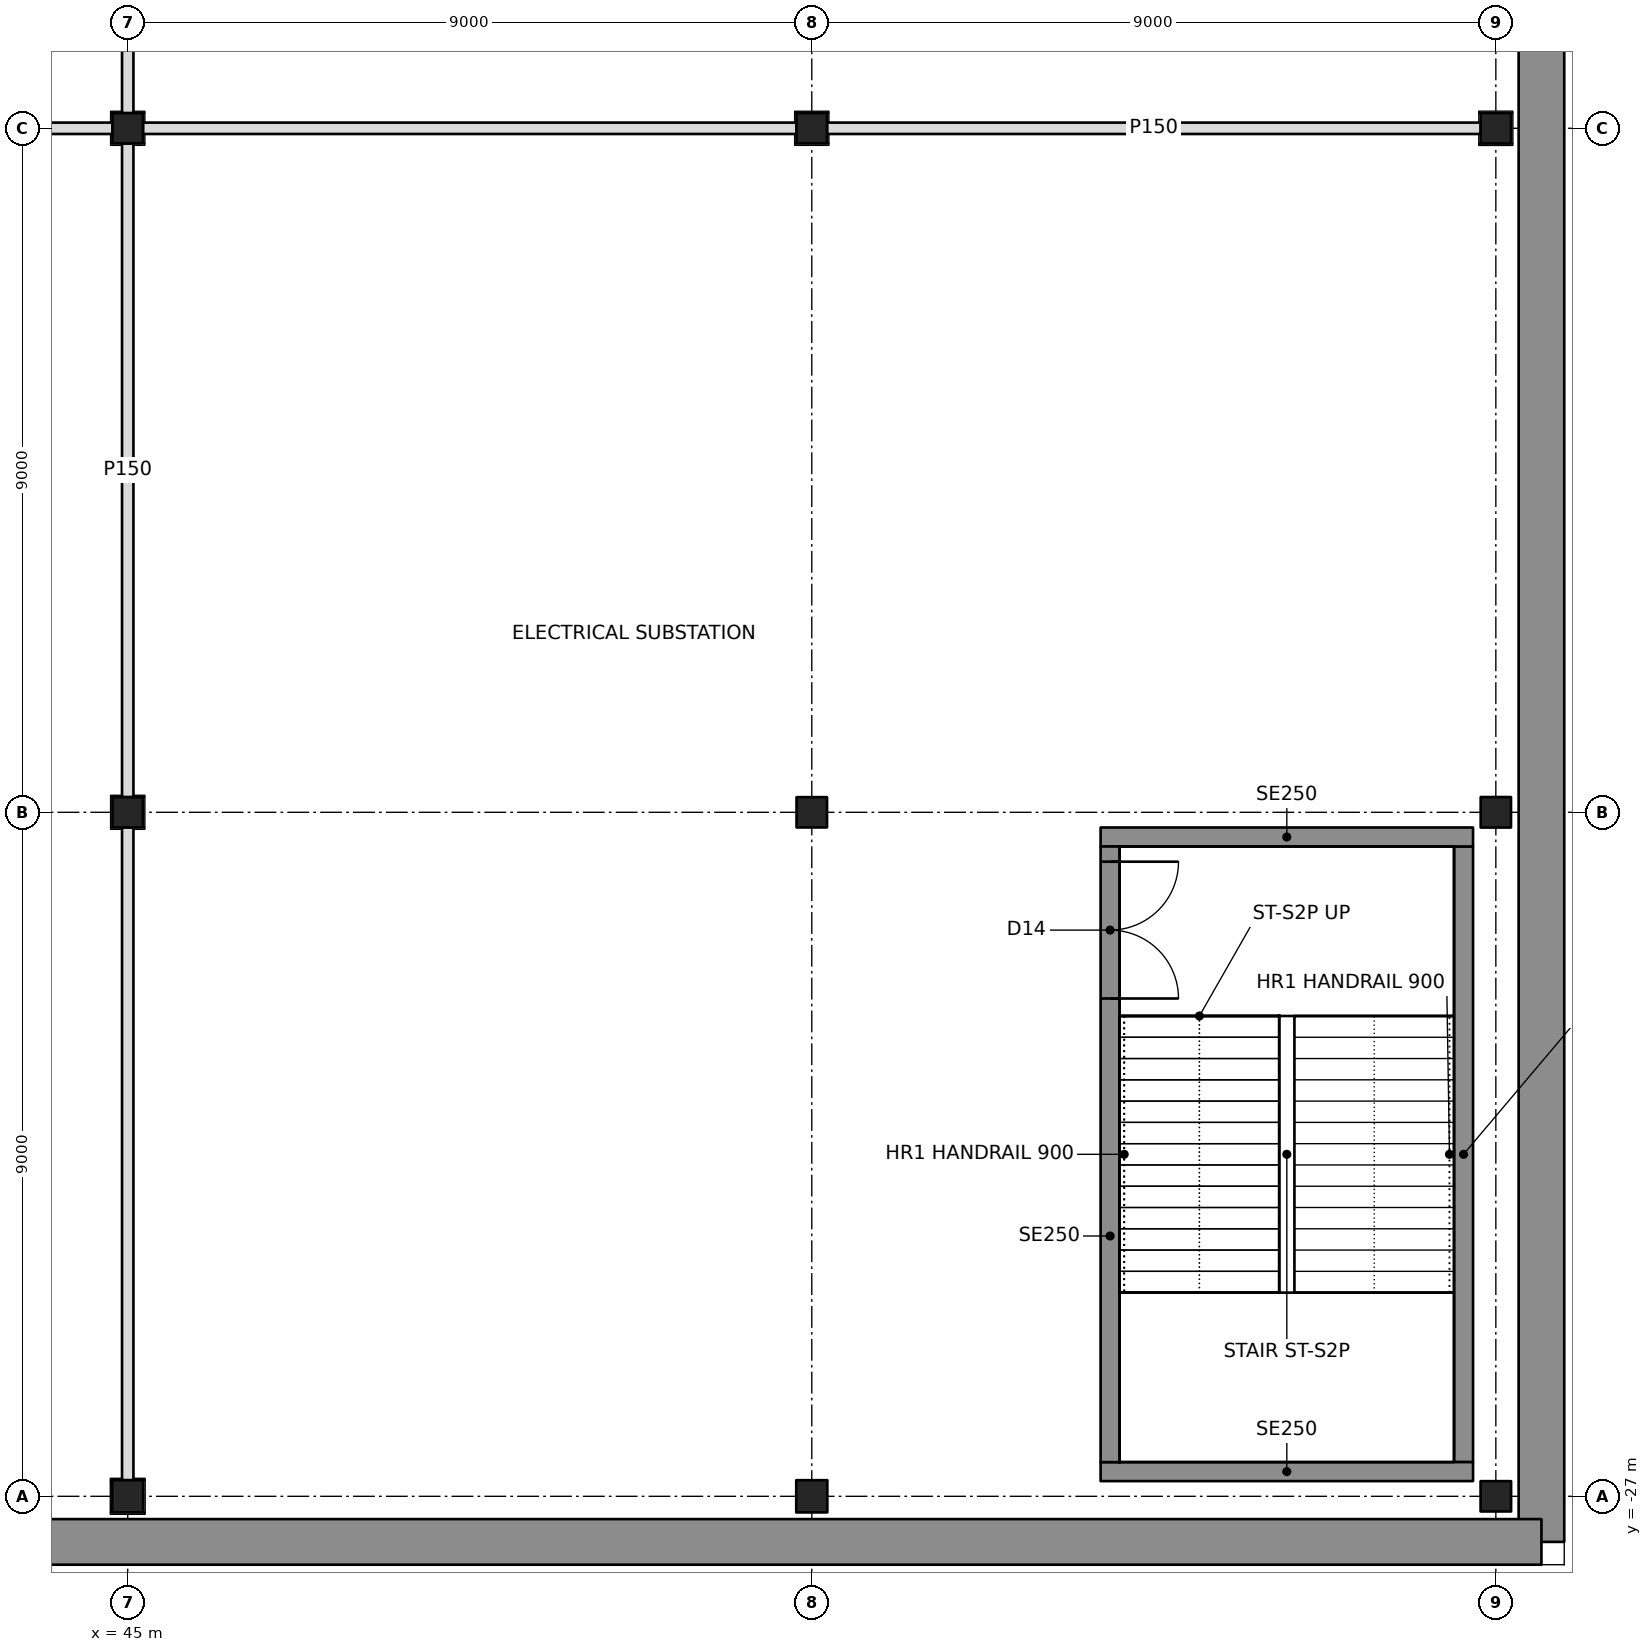
"""IFC4 building model, lengths in metres.
Left out: names, types, materials, properties, quantities, classifications, styles, units other than length and angle.
Written with IfcOpenShell. Run it as: python <this file> out.ifc"""

import sys

from ifc_helpers import new_model, si_unit, direction, frame, frame_2d, origin, origin_2d, place, context, subcontext, project, spatial, rectangle, i_section, extrude, element, fill, save


model = new_model("IFC4")
c1 = context("Model", 3, precision=1e-05, world=origin(), true_north=direction((0.0, 1.0)))
c2 = subcontext(c1, "Body", "Model", "MODEL_VIEW")
j1 = project(units=[si_unit("LENGTHUNIT", "METRE"), si_unit("PLANEANGLEUNIT", "RADIAN")], contexts=[c1])
p1 = place(None, origin())
s1 = spatial("IfcSite", under=j1, at=p1, CompositionType="ELEMENT")
p2 = place(p1, origin())
s2 = spatial("IfcBuilding", under=s1, at=p2, CompositionType="ELEMENT")
p3 = place(p2, frame((0.0, 0.0, -10.5)))
s3 = spatial("IfcBuildingStorey", under=s2, at=p3, CompositionType="ELEMENT", Elevation=-10.5)
p4 = place(p3, frame((45.0, -27.0, -0.5), z_axis=(0.0, 0.0, 1.0), x_axis=(1.0, 0.0, 0.0)))
e1 = element("IfcColumn", 1, at=p4, inside=s3, PredefinedType="COLUMN", context=c2, shape_type="SweptSolid", body=[
    extrude(i_section(OverallWidth=0.409, OverallDepth=0.424, WebThickness=0.033, FlangeThickness=0.052, at=origin_2d()), origin(), (0.0, 0.0, 1.0), 5.5),
])
for number, where, z_axis, x_axis in (
    (2, (45.0, -18.0, -0.5), (0.0, 0.0, 1.0), (1.0, 0.0, 0.0)),
    (3, (45.0, -9.0, -0.5), (0.0, 0.0, 1.0), (1.0, 0.0, 0.0)),
):
    element("IfcColumn", number, at=place(p3, frame(where, z_axis=z_axis, x_axis=x_axis)), inside=s3, PredefinedType="COLUMN", context=c2, shape_type="SweptSolid", body=[
        extrude(i_section(OverallWidth=0.401, OverallDepth=0.399, WebThickness=0.025, FlangeThickness=0.04, at=origin_2d()), origin(), (0.0, 0.0, 1.0), 5.5),
    ])
p5 = place(p3, frame((54.0, -27.0, -0.5), z_axis=(0.0, 0.0, 1.0), x_axis=(1.0, 0.0, 0.0)))
e4 = element("IfcColumn", 4, at=p5, inside=s3, PredefinedType="COLUMN", context=c2, shape_type="SweptSolid", body=[
    extrude(i_section(OverallWidth=0.409, OverallDepth=0.424, WebThickness=0.033, FlangeThickness=0.052, at=origin_2d()), origin(), (0.0, 0.0, 1.0), 5.5),
])
for number, where, z_axis, x_axis in (
    (5, (54.0, -18.0, -0.5), (0.0, 0.0, 1.0), (1.0, 0.0, 0.0)),
    (6, (54.0, -9.0, -0.5), (0.0, 0.0, 1.0), (1.0, 0.0, 0.0)),
    (7, (63.0, -27.0, -0.5), (0.0, 0.0, 1.0), (1.0, 0.0, 0.0)),
    (8, (63.0, -18.0, -0.5), (0.0, 0.0, 1.0), (0.0, 1.0, 0.0)),
    (9, (63.0, -9.0, -0.5), (0.0, 0.0, 1.0), (0.0, 1.0, 0.0)),
):
    element("IfcColumn", number, at=place(p3, frame(where, z_axis=z_axis, x_axis=x_axis)), inside=s3, PredefinedType="COLUMN", context=c2, shape_type="SweptSolid", body=[
        extrude(i_section(OverallWidth=0.401, OverallDepth=0.399, WebThickness=0.025, FlangeThickness=0.04, at=origin_2d()), origin(), (0.0, 0.0, 1.0), 5.5),
    ])
for number, where, z_axis, x_axis in (
    (10, (-9.6, -27.6, 0.0), (0.0, 0.0, 1.0), (1.0, 0.0, 0.0)),
    (11, (63.6, -27.6, 0.0), (0.0, 0.0, 1.0), (0.0, 1.0, 0.0)),
):
    element("IfcWall", number, at=place(p3, frame(where, z_axis=z_axis, x_axis=x_axis)), inside=s3, PredefinedType="SOLIDWALL", context=c2, shape_type="SweptSolid", body=[
        extrude(rectangle(XDim=73.2, YDim=0.6, at=frame_2d((36.6, 0.0))), origin(), (0.0, 0.0, 1.0), 4.7),
    ])
p6 = place(p3, frame((36.201, -9.0, 0.0), z_axis=(0.0, 0.0, 1.0), x_axis=(1.0, 0.0, 0.0)))
e12 = element("IfcWall", 12, at=p6, inside=s3, PredefinedType="PARTITIONING", context=c2, shape_type="SweptSolid", body=[
    extrude(rectangle(XDim=8.599, YDim=0.15, at=frame_2d((4.299, 0.0))), origin(), (0.0, 0.0, 1.0), 3.842),
])
p7 = place(p3, frame((45.0, -9.199, 0.0), z_axis=(0.0, 0.0, 1.0), x_axis=(0.0, -1.0, 0.0)))
e13 = element("IfcWall", 13, at=p7, inside=s3, PredefinedType="PARTITIONING", context=c2, shape_type="SweptSolid", body=[
    extrude(rectangle(XDim=8.601, YDim=0.15, at=frame_2d((4.301, 0.0))), origin(), (0.0, 0.0, 1.0), 3.842),
])
p8 = place(p3, frame((45.0, -18.199, 0.0), z_axis=(0.0, 0.0, 1.0), x_axis=(0.0, -1.0, 0.0)))
e14 = element("IfcWall", 14, at=p8, inside=s3, PredefinedType="PARTITIONING", context=c2, shape_type="SweptSolid", body=[
    extrude(rectangle(XDim=8.588, YDim=0.15, at=frame_2d((4.294, 0.0))), origin(), (0.0, 0.0, 1.0), 3.842),
])
p9 = place(p3, frame((45.201, -9.0, 0.0), z_axis=(0.0, 0.0, 1.0), x_axis=(1.0, 0.0, 0.0)))
e15 = element("IfcWall", 15, at=p9, inside=s3, PredefinedType="PARTITIONING", context=c2, shape_type="SweptSolid", body=[
    extrude(rectangle(XDim=8.599, YDim=0.15, at=frame_2d((4.299, 0.0))), origin(), (0.0, 0.0, 1.0), 3.842),
])
p10 = place(p3, frame((54.201, -9.0, 0.0), z_axis=(0.0, 0.0, 1.0), x_axis=(1.0, 0.0, 0.0)))
e16 = element("IfcWall", 16, at=p10, inside=s3, PredefinedType="PARTITIONING", context=c2, shape_type="SweptSolid", body=[
    extrude(rectangle(XDim=8.6, YDim=0.15, at=frame_2d((4.3, 0.0))), origin(), (0.0, 0.0, 1.0), 3.842),
])
p11 = place(p3, frame((45.0, -8.801, 0.0), z_axis=(0.0, 0.0, 1.0), x_axis=(0.0, 1.0, 0.0)))
e17 = element("IfcWall", 17, at=p11, inside=s3, PredefinedType="PARTITIONING", context=c2, shape_type="SweptSolid", body=[
    extrude(rectangle(XDim=8.401, YDim=0.15, at=frame_2d((4.2, 0.0))), origin(), (0.0, 0.0, 1.0), 3.842),
])
p12 = place(p11, frame((6.801, 0.0, 0.0)))
e18 = element("IfcOpeningElement", 18, at=p12, cuts=e17, PredefinedType="OPENING", context=c2, shape_type="SweptSolid", body=[
    extrude(rectangle(XDim=1.0, YDim=2.1, at=frame_2d((0.5, 1.05))), frame((0.0, 0.085, 0.0), z_axis=(0.0, -1.0, 0.0), x_axis=(1.0, 0.0, 0.0)), (0.0, 0.0, 1.0), 0.17),
])
for number, where, z_axis, x_axis in (
    (19, (57.8, -26.675, 0.0), (0.0, 0.0, 1.0), (1.0, 0.0, 0.0)),
    (20, (57.8, -18.325, 0.0), (0.0, 0.0, 1.0), (1.0, 0.0, 0.0)),
):
    element("IfcWall", number, at=place(p3, frame(where, z_axis=z_axis, x_axis=x_axis)), inside=s3, PredefinedType="SOLIDWALL", context=c2, shape_type="SweptSolid", body=[
        extrude(rectangle(XDim=4.9, YDim=0.25, at=frame_2d((2.45, 0.0))), origin(), (0.0, 0.0, 1.0), 4.7),
    ])
p13 = place(p3, frame((57.925, -26.55, 0.0), z_axis=(0.0, 0.0, 1.0), x_axis=(0.0, 1.0, 0.0)))
e21 = element("IfcWall", 21, at=p13, inside=s3, PredefinedType="SOLIDWALL", context=c2, shape_type="SweptSolid", body=[
    extrude(rectangle(XDim=8.1, YDim=0.25, at=frame_2d((4.05, 0.0))), origin(), (0.0, 0.0, 1.0), 4.7),
])
p14 = place(p13, frame((6.1, 0.0, 0.0)))
e22 = element("IfcOpeningElement", 22, at=p14, cuts=e21, PredefinedType="OPENING", context=c2, shape_type="SweptSolid", body=[
    extrude(rectangle(XDim=1.8, YDim=2.1, at=frame_2d((0.9, 1.05))), frame((0.0, 0.135, 0.0), z_axis=(0.0, -1.0, 0.0), x_axis=(1.0, 0.0, 0.0)), (0.0, 0.0, 1.0), 0.27),
])
p15 = place(p3, frame((62.575, -26.55, 0.0), z_axis=(0.0, 0.0, 1.0), x_axis=(0.0, 1.0, 0.0)))
e23 = element("IfcWall", 23, at=p15, inside=s3, PredefinedType="SOLIDWALL", context=c2, shape_type="SweptSolid", body=[
    extrude(rectangle(XDim=8.1, YDim=0.25, at=frame_2d((4.05, 0.0))), origin(), (0.0, 0.0, 1.0), 4.7),
])
p16 = place(p14, frame((1.8, 0.0, 0.0), z_axis=(0.0, 0.0, 1.0), x_axis=(-1.0, 0.0, 0.0)))
e24 = element("IfcDoor", 24, at=p16, inside=s3, OperationType="DOUBLE_DOOR_SINGLE_SWING", PredefinedType="DOOR", context=c2, shape_type="SweptSolid", body=[
    extrude(rectangle(XDim=1.8, YDim=2.1, at=frame_2d((0.9, 1.05))), frame((0.0, 0.025, 0.0), z_axis=(0.0, -1.0, 0.0), x_axis=(1.0, 0.0, 0.0)), (0.0, 0.0, 1.0), 0.05),
])
fill(e22, e24)
save(model, sys.argv[1])
